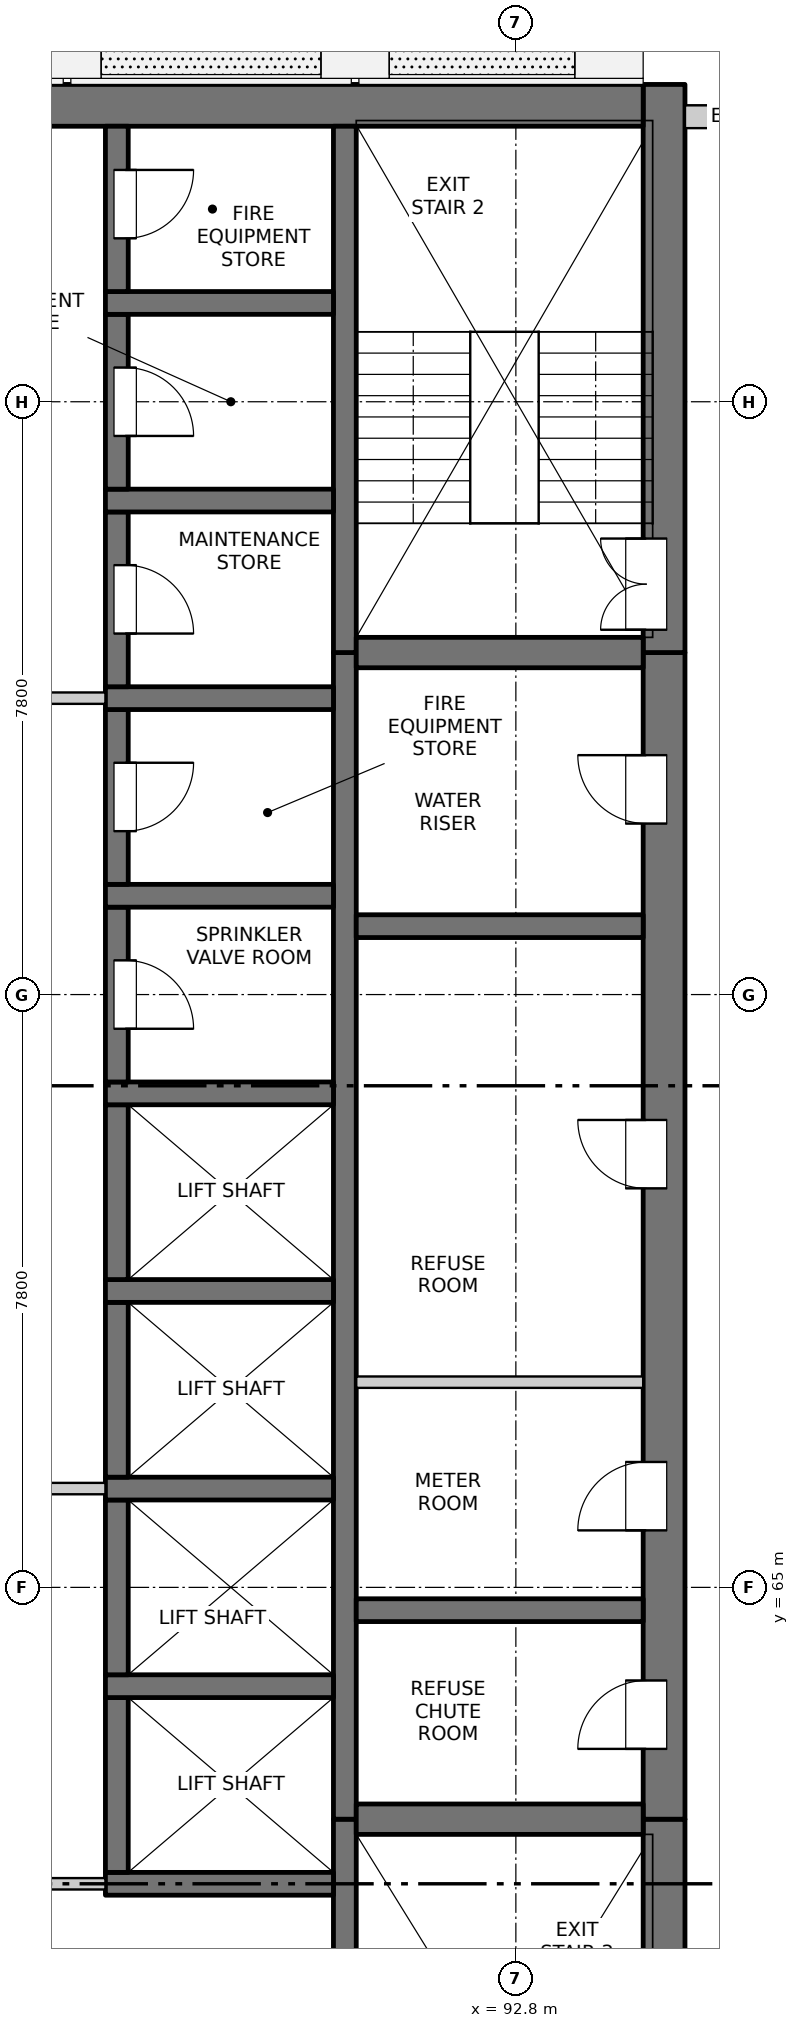
"""IFC4 building model, lengths in metres.
Left out: names, types, materials, properties, quantities, classifications, styles, units other than length and angle.
Written with IfcOpenShell. Run it as: python <this file> out.ifc"""

import sys

from ifc_helpers import new_model, si_unit, direction, frame, frame_2d, origin, place, context, subcontext, project, spatial, rectangle, extrude, element, fill, save


model = new_model("IFC4")
c1 = context("Model", 3, precision=1e-05, world=origin(), true_north=direction((0.0, 1.0)))
c2 = subcontext(c1, "Body", "Model", "MODEL_VIEW")
j1 = project(units=[si_unit("LENGTHUNIT", "METRE"), si_unit("PLANEANGLEUNIT", "RADIAN")], contexts=[c1])
p1 = place(None, origin())
s1 = spatial("IfcSite", under=j1, at=p1, CompositionType="ELEMENT")
p2 = place(p1, origin())
s2 = spatial("IfcBuilding", under=s1, at=p2, CompositionType="ELEMENT")
p3 = place(p2, frame((0.0, 0.0, 113.5)))
s3 = spatial("IfcBuildingStorey", under=s2, at=p3, CompositionType="ELEMENT", Elevation=113.5)
p4 = place(p3, frame((94.75, 54.975, -0.25), z_axis=(0.0, 0.0, 1.0), x_axis=(0.0, 1.0, 0.0)))
e1 = element("IfcWall", 1, at=p4, inside=s3, PredefinedType="SOLIDWALL", context=c2, shape_type="SweptSolid", body=[
    extrude(rectangle(XDim=6.975, YDim=0.55, at=frame_2d((3.487, 0.0))), origin(), (0.0, 0.0, 1.0), 3.35),
])
p5 = place(p4, frame((0.675, 0.0, 0.25)))
e2 = element("IfcOpeningElement", 2, at=p5, cuts=e1, PredefinedType="OPENING", context=c2, shape_type="SweptSolid", body=[
    extrude(rectangle(XDim=1.2, YDim=2.1, at=frame_2d((0.6, 1.05))), frame((0.0, 0.285, 0.0), z_axis=(0.0, -1.0, 0.0), x_axis=(1.0, 0.0, 0.0)), (0.0, 0.0, 1.0), 0.57),
])
p6 = place(p3, frame((94.75, 61.95, -0.25), z_axis=(0.0, 0.0, 1.0), x_axis=(0.0, 1.0, 0.0)))
e3 = element("IfcWall", 3, at=p6, inside=s3, PredefinedType="SOLIDWALL", context=c2, shape_type="SweptSolid", body=[
    extrude(rectangle(XDim=15.35, YDim=0.55, at=frame_2d((7.675, 0.0))), origin(), (0.0, 0.0, 1.0), 3.35),
])
p7 = place(p6, frame((0.925, 0.0, 0.25)))
e4 = element("IfcOpeningElement", 4, at=p7, cuts=e3, PredefinedType="OPENING", context=c2, shape_type="SweptSolid", body=[
    extrude(rectangle(XDim=0.9, YDim=2.1, at=frame_2d((0.45, 1.05))), frame((0.0, 0.285, 0.0), z_axis=(0.0, -1.0, 0.0), x_axis=(1.0, 0.0, 0.0)), (0.0, 0.0, 1.0), 0.57),
])
p8 = place(p6, frame((3.8, 0.0, 0.25)))
e5 = element("IfcOpeningElement", 5, at=p8, cuts=e3, PredefinedType="OPENING", context=c2, shape_type="SweptSolid", body=[
    extrude(rectangle(XDim=0.9, YDim=2.1, at=frame_2d((0.45, 1.05))), frame((0.0, 0.285, 0.0), z_axis=(0.0, -1.0, 0.0), x_axis=(1.0, 0.0, 0.0)), (0.0, 0.0, 1.0), 0.57),
])
p9 = place(p6, frame((8.3, 0.0, 0.25)))
e6 = element("IfcOpeningElement", 6, at=p9, cuts=e3, PredefinedType="OPENING", context=c2, shape_type="SweptSolid", body=[
    extrude(rectangle(XDim=0.9, YDim=2.1, at=frame_2d((0.45, 1.05))), frame((0.0, 0.285, 0.0), z_axis=(0.0, -1.0, 0.0), x_axis=(1.0, 0.0, 0.0)), (0.0, 0.0, 1.0), 0.57),
])
p10 = place(p6, frame((13.1, 0.0, 0.25)))
e7 = element("IfcOpeningElement", 7, at=p10, cuts=e3, PredefinedType="OPENING", context=c2, shape_type="SweptSolid", body=[
    extrude(rectangle(XDim=0.9, YDim=2.1, at=frame_2d((0.45, 1.05))), frame((0.0, 0.285, 0.0), z_axis=(0.0, -1.0, 0.0), x_axis=(1.0, 0.0, 0.0)), (0.0, 0.0, 1.0), 0.57),
])
p11 = place(p3, frame((94.75, 77.3, -0.25), z_axis=(0.0, 0.0, 1.0), x_axis=(0.0, 1.0, 0.0)))
e8 = element("IfcWall", 8, at=p11, inside=s3, PredefinedType="SOLIDWALL", context=c2, shape_type="SweptSolid", body=[
    extrude(rectangle(XDim=7.475, YDim=0.55, at=frame_2d((3.737, 0.0))), origin(), (0.0, 0.0, 1.0), 3.35),
])
p12 = place(p11, frame((0.3, 0.0, 0.25)))
e9 = element("IfcOpeningElement", 9, at=p12, cuts=e8, PredefinedType="OPENING", context=c2, shape_type="SweptSolid", body=[
    extrude(rectangle(XDim=1.2, YDim=2.1, at=frame_2d((0.6, 1.05))), frame((0.0, 0.285, 0.0), z_axis=(0.0, -1.0, 0.0), x_axis=(1.0, 0.0, 0.0)), (0.0, 0.0, 1.0), 0.57),
])
p13 = place(p3, frame((75.525, 84.5, -0.25), z_axis=(0.0, 0.0, 1.0), x_axis=(1.0, 0.0, 0.0)))
e10 = element("IfcWall", 10, at=p13, inside=s3, PredefinedType="SOLIDWALL", context=c2, shape_type="SweptSolid", body=[
    extrude(rectangle(XDim=18.95, YDim=0.55, at=frame_2d((9.475, 0.0))), origin(), (0.0, 0.0, 1.0), 3.35),
])
p14 = place(p3, frame((90.55, 55.525, -0.25), z_axis=(0.0, 0.0, 1.0), x_axis=(0.0, 1.0, 0.0)))
e11 = element("IfcWall", 11, at=p14, inside=s3, PredefinedType="SOLIDWALL", context=c2, shape_type="SweptSolid", body=[
    extrude(rectangle(XDim=6.425, YDim=0.3, at=frame_2d((3.212, 0.0))), origin(), (0.0, 0.0, 1.0), 3.35),
])
p15 = place(p14, frame((0.125, 0.0, 0.25)))
e12 = element("IfcOpeningElement", 12, at=p15, cuts=e11, PredefinedType="OPENING", context=c2, shape_type="SweptSolid", body=[
    extrude(rectangle(XDim=1.2, YDim=2.1, at=frame_2d((0.6, 1.05))), frame((0.0, 0.16, 0.0), z_axis=(0.0, -1.0, 0.0), x_axis=(1.0, 0.0, 0.0)), (0.0, 0.0, 1.0), 0.32),
])
p16 = place(p3, frame((90.55, 61.95, -0.25), z_axis=(0.0, 0.0, 1.0), x_axis=(0.0, 1.0, 0.0)))
e13 = element("IfcWall", 13, at=p16, inside=s3, PredefinedType="SOLIDWALL", context=c2, shape_type="SweptSolid", body=[
    extrude(rectangle(XDim=15.35, YDim=0.3, at=frame_2d((7.675, 0.0))), origin(), (0.0, 0.0, 1.0), 3.35),
])
p17 = place(p3, frame((90.55, 77.3, -0.25), z_axis=(0.0, 0.0, 1.0), x_axis=(0.0, 1.0, 0.0)))
e14 = element("IfcWall", 14, at=p17, inside=s3, PredefinedType="SOLIDWALL", context=c2, shape_type="SweptSolid", body=[
    extrude(rectangle(XDim=6.925, YDim=0.3, at=frame_2d((3.462, 0.0))), origin(), (0.0, 0.0, 1.0), 3.35),
])
p18 = place(p3, frame((87.4, 61.1, -0.25), z_axis=(0.0, 0.0, 1.0), x_axis=(1.0, 0.0, 0.0)))
e15 = element("IfcWall", 15, at=p18, inside=s3, PredefinedType="SOLIDWALL", context=c2, shape_type="SweptSolid", body=[
    extrude(rectangle(XDim=3.0, YDim=0.3, at=frame_2d((1.5, 0.0))), origin(), (0.0, 0.0, 1.0), 3.35),
])
p19 = place(p3, frame((87.55, 61.25, -0.25), z_axis=(0.0, 0.0, 1.0), x_axis=(0.0, 1.0, 0.0)))
e16 = element("IfcWall", 16, at=p19, inside=s3, PredefinedType="SOLIDWALL", context=c2, shape_type="SweptSolid", body=[
    extrude(rectangle(XDim=2.3, YDim=0.3, at=frame_2d((1.15, 0.0))), origin(), (0.0, 0.0, 1.0), 3.35),
])
p20 = place(p3, frame((87.4, 63.7, -0.25), z_axis=(0.0, 0.0, 1.0), x_axis=(1.0, 0.0, 0.0)))
e17 = element("IfcWall", 17, at=p20, inside=s3, PredefinedType="SOLIDWALL", context=c2, shape_type="SweptSolid", body=[
    extrude(rectangle(XDim=3.0, YDim=0.3, at=frame_2d((1.5, 0.0))), origin(), (0.0, 0.0, 1.0), 3.35),
])
p21 = place(p3, frame((87.55, 63.85, -0.25), z_axis=(0.0, 0.0, 1.0), x_axis=(0.0, 1.0, 0.0)))
e18 = element("IfcWall", 18, at=p21, inside=s3, PredefinedType="SOLIDWALL", context=c2, shape_type="SweptSolid", body=[
    extrude(rectangle(XDim=2.3, YDim=0.3, at=frame_2d((1.15, 0.0))), origin(), (0.0, 0.0, 1.0), 3.35),
])
p22 = place(p3, frame((87.4, 66.3, -0.25), z_axis=(0.0, 0.0, 1.0), x_axis=(1.0, 0.0, 0.0)))
e19 = element("IfcWall", 19, at=p22, inside=s3, PredefinedType="SOLIDWALL", context=c2, shape_type="SweptSolid", body=[
    extrude(rectangle(XDim=3.0, YDim=0.3, at=frame_2d((1.5, 0.0))), origin(), (0.0, 0.0, 1.0), 3.35),
])
p23 = place(p3, frame((87.55, 66.45, -0.25), z_axis=(0.0, 0.0, 1.0), x_axis=(0.0, 1.0, 0.0)))
e20 = element("IfcWall", 20, at=p23, inside=s3, PredefinedType="SOLIDWALL", context=c2, shape_type="SweptSolid", body=[
    extrude(rectangle(XDim=2.3, YDim=0.3, at=frame_2d((1.15, 0.0))), origin(), (0.0, 0.0, 1.0), 3.35),
])
p24 = place(p3, frame((87.4, 68.9, -0.25), z_axis=(0.0, 0.0, 1.0), x_axis=(1.0, 0.0, 0.0)))
e21 = element("IfcWall", 21, at=p24, inside=s3, PredefinedType="SOLIDWALL", context=c2, shape_type="SweptSolid", body=[
    extrude(rectangle(XDim=3.0, YDim=0.3, at=frame_2d((1.5, 0.0))), origin(), (0.0, 0.0, 1.0), 3.35),
])
p25 = place(p3, frame((87.55, 69.05, -0.25), z_axis=(0.0, 0.0, 1.0), x_axis=(0.0, 1.0, 0.0)))
e22 = element("IfcWall", 22, at=p25, inside=s3, PredefinedType="SOLIDWALL", context=c2, shape_type="SweptSolid", body=[
    extrude(rectangle(XDim=2.3, YDim=0.3, at=frame_2d((1.15, 0.0))), origin(), (0.0, 0.0, 1.0), 3.35),
])
p26 = place(p3, frame((87.4, 71.5, -0.25), z_axis=(0.0, 0.0, 1.0), x_axis=(1.0, 0.0, 0.0)))
e23 = element("IfcWall", 23, at=p26, inside=s3, PredefinedType="SOLIDWALL", context=c2, shape_type="SweptSolid", body=[
    extrude(rectangle(XDim=3.0, YDim=0.3, at=frame_2d((1.5, 0.0))), origin(), (0.0, 0.0, 1.0), 3.35),
])
p27 = place(p3, frame((87.55, 71.65, -0.25), z_axis=(0.0, 0.0, 1.0), x_axis=(0.0, 1.0, 0.0)))
e24 = element("IfcWall", 24, at=p27, inside=s3, PredefinedType="SOLIDWALL", context=c2, shape_type="SweptSolid", body=[
    extrude(rectangle(XDim=2.3, YDim=0.3, at=frame_2d((1.15, 0.0))), origin(), (0.0, 0.0, 1.0), 3.35),
])
p28 = place(p27, frame((0.7, 0.0, 0.25)))
e25 = element("IfcOpeningElement", 25, at=p28, cuts=e24, PredefinedType="OPENING", context=c2, shape_type="SweptSolid", body=[
    extrude(rectangle(XDim=0.9, YDim=2.1, at=frame_2d((0.45, 1.05))), frame((0.0, 0.16, 0.0), z_axis=(0.0, -1.0, 0.0), x_axis=(1.0, 0.0, 0.0)), (0.0, 0.0, 1.0), 0.32),
])
p29 = place(p3, frame((87.4, 74.1, -0.25), z_axis=(0.0, 0.0, 1.0), x_axis=(1.0, 0.0, 0.0)))
e26 = element("IfcWall", 26, at=p29, inside=s3, PredefinedType="SOLIDWALL", context=c2, shape_type="SweptSolid", body=[
    extrude(rectangle(XDim=3.0, YDim=0.3, at=frame_2d((1.5, 0.0))), origin(), (0.0, 0.0, 1.0), 3.35),
])
p30 = place(p3, frame((87.55, 74.25, -0.25), z_axis=(0.0, 0.0, 1.0), x_axis=(0.0, 1.0, 0.0)))
e27 = element("IfcWall", 27, at=p30, inside=s3, PredefinedType="SOLIDWALL", context=c2, shape_type="SweptSolid", body=[
    extrude(rectangle(XDim=2.3, YDim=0.3, at=frame_2d((1.15, 0.0))), origin(), (0.0, 0.0, 1.0), 3.35),
])
p31 = place(p30, frame((0.7, 0.0, 0.25)))
e28 = element("IfcOpeningElement", 28, at=p31, cuts=e27, PredefinedType="OPENING", context=c2, shape_type="SweptSolid", body=[
    extrude(rectangle(XDim=0.9, YDim=2.1, at=frame_2d((0.45, 1.05))), frame((0.0, 0.16, 0.0), z_axis=(0.0, -1.0, 0.0), x_axis=(1.0, 0.0, 0.0)), (0.0, 0.0, 1.0), 0.32),
])
p32 = place(p3, frame((87.4, 76.7, -0.25), z_axis=(0.0, 0.0, 1.0), x_axis=(1.0, 0.0, 0.0)))
e29 = element("IfcWall", 29, at=p32, inside=s3, PredefinedType="SOLIDWALL", context=c2, shape_type="SweptSolid", body=[
    extrude(rectangle(XDim=3.0, YDim=0.3, at=frame_2d((1.5, 0.0))), origin(), (0.0, 0.0, 1.0), 3.35),
])
p33 = place(p3, frame((87.55, 76.85, -0.25), z_axis=(0.0, 0.0, 1.0), x_axis=(0.0, 1.0, 0.0)))
e30 = element("IfcWall", 30, at=p33, inside=s3, PredefinedType="SOLIDWALL", context=c2, shape_type="SweptSolid", body=[
    extrude(rectangle(XDim=2.3, YDim=0.3, at=frame_2d((1.15, 0.0))), origin(), (0.0, 0.0, 1.0), 3.35),
])
p34 = place(p33, frame((0.7, 0.0, 0.25)))
e31 = element("IfcOpeningElement", 31, at=p34, cuts=e30, PredefinedType="OPENING", context=c2, shape_type="SweptSolid", body=[
    extrude(rectangle(XDim=0.9, YDim=2.1, at=frame_2d((0.45, 1.05))), frame((0.0, 0.16, 0.0), z_axis=(0.0, -1.0, 0.0), x_axis=(1.0, 0.0, 0.0)), (0.0, 0.0, 1.0), 0.32),
])
p35 = place(p3, frame((87.4, 79.3, -0.25), z_axis=(0.0, 0.0, 1.0), x_axis=(1.0, 0.0, 0.0)))
e32 = element("IfcWall", 32, at=p35, inside=s3, PredefinedType="SOLIDWALL", context=c2, shape_type="SweptSolid", body=[
    extrude(rectangle(XDim=3.0, YDim=0.3, at=frame_2d((1.5, 0.0))), origin(), (0.0, 0.0, 1.0), 3.35),
])
p36 = place(p3, frame((87.55, 79.45, -0.25), z_axis=(0.0, 0.0, 1.0), x_axis=(0.0, 1.0, 0.0)))
e33 = element("IfcWall", 33, at=p36, inside=s3, PredefinedType="SOLIDWALL", context=c2, shape_type="SweptSolid", body=[
    extrude(rectangle(XDim=2.3, YDim=0.3, at=frame_2d((1.15, 0.0))), origin(), (0.0, 0.0, 1.0), 3.35),
])
p37 = place(p36, frame((0.7, 0.0, 0.25)))
e34 = element("IfcOpeningElement", 34, at=p37, cuts=e33, PredefinedType="OPENING", context=c2, shape_type="SweptSolid", body=[
    extrude(rectangle(XDim=0.9, YDim=2.1, at=frame_2d((0.45, 1.05))), frame((0.0, 0.16, 0.0), z_axis=(0.0, -1.0, 0.0), x_axis=(1.0, 0.0, 0.0)), (0.0, 0.0, 1.0), 0.32),
])
p38 = place(p3, frame((87.4, 81.9, -0.25), z_axis=(0.0, 0.0, 1.0), x_axis=(1.0, 0.0, 0.0)))
e35 = element("IfcWall", 35, at=p38, inside=s3, PredefinedType="SOLIDWALL", context=c2, shape_type="SweptSolid", body=[
    extrude(rectangle(XDim=3.0, YDim=0.3, at=frame_2d((1.5, 0.0))), origin(), (0.0, 0.0, 1.0), 3.35),
])
p39 = place(p3, frame((87.55, 82.05, -0.25), z_axis=(0.0, 0.0, 1.0), x_axis=(0.0, 1.0, 0.0)))
e36 = element("IfcWall", 36, at=p39, inside=s3, PredefinedType="SOLIDWALL", context=c2, shape_type="SweptSolid", body=[
    extrude(rectangle(XDim=2.175, YDim=0.3, at=frame_2d((1.087, 0.0))), origin(), (0.0, 0.0, 1.0), 3.35),
])
p40 = place(p39, frame((0.7, 0.0, 0.25)))
e37 = element("IfcOpeningElement", 37, at=p40, cuts=e36, PredefinedType="OPENING", context=c2, shape_type="SweptSolid", body=[
    extrude(rectangle(XDim=0.9, YDim=2.1, at=frame_2d((0.45, 1.05))), frame((0.0, 0.16, 0.0), z_axis=(0.0, -1.0, 0.0), x_axis=(1.0, 0.0, 0.0)), (0.0, 0.0, 1.0), 0.32),
])
p41 = place(p3, frame((90.7, 61.95, -0.25), z_axis=(0.0, 0.0, 1.0), x_axis=(1.0, 0.0, 0.0)))
e38 = element("IfcWall", 38, at=p41, inside=s3, PredefinedType="SOLIDWALL", context=c2, shape_type="SweptSolid", body=[
    extrude(rectangle(XDim=3.775, YDim=0.4, at=frame_2d((1.888, 0.0))), origin(), (0.0, 0.0, 1.0), 3.35),
])
for number, where, z_axis, x_axis in (
    (39, (90.7, 64.7, -0.25), (0.0, 0.0, 1.0), (1.0, 0.0, 0.0)),
    (40, (90.7, 73.7, -0.25), (0.0, 0.0, 1.0), (1.0, 0.0, 0.0)),
):
    element("IfcWall", number, at=place(p3, frame(where, z_axis=z_axis, x_axis=x_axis)), inside=s3, PredefinedType="SOLIDWALL", context=c2, shape_type="SweptSolid", body=[
        extrude(rectangle(XDim=3.775, YDim=0.3, at=frame_2d((1.888, 0.0))), origin(), (0.0, 0.0, 1.0), 3.35),
    ])
p42 = place(p3, frame((90.7, 77.3, -0.25), z_axis=(0.0, 0.0, 1.0), x_axis=(1.0, 0.0, 0.0)))
e41 = element("IfcWall", 41, at=p42, inside=s3, PredefinedType="SOLIDWALL", context=c2, shape_type="SweptSolid", body=[
    extrude(rectangle(XDim=3.775, YDim=0.4, at=frame_2d((1.888, 0.0))), origin(), (0.0, 0.0, 1.0), 3.35),
])
p43 = place(p3, frame((95.025, 84.35, 0.0), z_axis=(0.0, 0.0, 1.0), x_axis=(1.0, 0.0, 0.0)))
e42 = element("IfcWall", 42, at=p43, inside=s3, PredefinedType="SOLIDWALL", context=c2, shape_type="SweptSolid", body=[
    extrude(rectangle(XDim=1.25, YDim=0.3, at=frame_2d((0.625, 0.0))), origin(), (0.0, 0.0, 1.0), 3.1),
])
p44 = place(p3, frame((82.6, 61.1, 0.0), z_axis=(0.0, 0.0, 1.0), x_axis=(1.0, 0.0, 0.0)))
e43 = element("IfcWall", 43, at=p44, inside=s3, PredefinedType="PARTITIONING", context=c2, shape_type="SweptSolid", body=[
    extrude(rectangle(XDim=4.8, YDim=0.15, at=frame_2d((2.4, 0.0))), origin(), (0.0, 0.0, 1.0), 3.1),
])
p45 = place(p44, frame((1.5, 0.0, 0.0)))
e44 = element("IfcOpeningElement", 44, at=p45, cuts=e43, PredefinedType="OPENING", context=c2, shape_type="SweptSolid", body=[
    extrude(rectangle(XDim=1.8, YDim=2.1, at=frame_2d((0.9, 1.05))), frame((0.0, 0.085, 0.0), z_axis=(0.0, -1.0, 0.0), x_axis=(1.0, 0.0, 0.0)), (0.0, 0.0, 1.0), 0.17),
])
p46 = place(p3, frame((82.6, 66.3, 0.0), z_axis=(0.0, 0.0, 1.0), x_axis=(1.0, 0.0, 0.0)))
e45 = element("IfcWall", 45, at=p46, inside=s3, PredefinedType="PARTITIONING", context=c2, shape_type="SweptSolid", body=[
    extrude(rectangle(XDim=4.8, YDim=0.15, at=frame_2d((2.4, 0.0))), origin(), (0.0, 0.0, 1.0), 3.1),
])
p47 = place(p46, frame((1.5, 0.0, 0.0)))
e46 = element("IfcOpeningElement", 46, at=p47, cuts=e45, PredefinedType="OPENING", context=c2, shape_type="SweptSolid", body=[
    extrude(rectangle(XDim=1.8, YDim=2.1, at=frame_2d((0.9, 1.05))), frame((0.0, 0.085, 0.0), z_axis=(0.0, -1.0, 0.0), x_axis=(1.0, 0.0, 0.0)), (0.0, 0.0, 1.0), 0.17),
])
p48 = place(p3, frame((90.7, 67.7, 0.0), z_axis=(0.0, 0.0, 1.0), x_axis=(1.0, 0.0, 0.0)))
e47 = element("IfcWall", 47, at=p48, inside=s3, PredefinedType="PARTITIONING", context=c2, shape_type="SweptSolid", body=[
    extrude(rectangle(XDim=3.775, YDim=0.15, at=frame_2d((1.887, 0.0))), origin(), (0.0, 0.0, 1.0), 3.1),
])
p49 = place(p3, frame((82.6, 76.7, 0.0), z_axis=(0.0, 0.0, 1.0), x_axis=(1.0, 0.0, 0.0)))
e48 = element("IfcWall", 48, at=p49, inside=s3, PredefinedType="PARTITIONING", context=c2, shape_type="SweptSolid", body=[
    extrude(rectangle(XDim=4.8, YDim=0.15, at=frame_2d((2.4, 0.0))), origin(), (0.0, 0.0, 1.0), 3.1),
])
p50 = place(p49, frame((1.5, 0.0, 0.0)))
e49 = element("IfcOpeningElement", 49, at=p50, cuts=e48, PredefinedType="OPENING", context=c2, shape_type="SweptSolid", body=[
    extrude(rectangle(XDim=1.8, YDim=2.1, at=frame_2d((0.9, 1.05))), frame((0.0, 0.085, 0.0), z_axis=(0.0, -1.0, 0.0), x_axis=(1.0, 0.0, 0.0)), (0.0, 0.0, 1.0), 0.17),
])
p51 = place(p7, origin())
e50 = element("IfcDoor", 50, at=p51, inside=s3, OperationType="SINGLE_SWING_LEFT", PredefinedType="DOOR", context=c2, shape_type="SweptSolid", body=[
    extrude(rectangle(XDim=0.9, YDim=2.1, at=frame_2d((0.45, 1.05))), frame((0.0, 0.26, 0.0), z_axis=(0.0, -1.0, 0.0), x_axis=(1.0, 0.0, 0.0)), (0.0, 0.0, 1.0), 0.05),
])
fill(e4, e50)
p52 = place(p8, origin())
e51 = element("IfcDoor", 51, at=p52, inside=s3, OperationType="SINGLE_SWING_LEFT", PredefinedType="DOOR", context=c2, shape_type="SweptSolid", body=[
    extrude(rectangle(XDim=0.9, YDim=2.1, at=frame_2d((0.45, 1.05))), frame((0.0, 0.26, 0.0), z_axis=(0.0, -1.0, 0.0), x_axis=(1.0, 0.0, 0.0)), (0.0, 0.0, 1.0), 0.05),
])
fill(e5, e51)
p53 = place(p9, origin())
e52 = element("IfcDoor", 52, at=p53, inside=s3, OperationType="SINGLE_SWING_RIGHT", PredefinedType="DOOR", context=c2, shape_type="SweptSolid", body=[
    extrude(rectangle(XDim=0.9, YDim=2.1, at=frame_2d((0.45, 1.05))), frame((0.0, 0.26, 0.0), z_axis=(0.0, -1.0, 0.0), x_axis=(1.0, 0.0, 0.0)), (0.0, 0.0, 1.0), 0.05),
])
fill(e6, e52)
p54 = place(p28, origin())
e53 = element("IfcDoor", 53, at=p54, inside=s3, OperationType="SINGLE_SWING_RIGHT", PredefinedType="DOOR", context=c2, shape_type="SweptSolid", body=[
    extrude(rectangle(XDim=0.9, YDim=2.1, at=frame_2d((0.45, 1.05))), frame((0.0, -0.085, 0.0), z_axis=(0.0, -1.0, 0.0), x_axis=(1.0, 0.0, 0.0)), (0.0, 0.0, 1.0), 0.05),
])
fill(e25, e53)
p55 = place(p31, origin())
e54 = element("IfcDoor", 54, at=p55, inside=s3, OperationType="SINGLE_SWING_LEFT", PredefinedType="DOOR", context=c2, shape_type="SweptSolid", body=[
    extrude(rectangle(XDim=0.9, YDim=2.1, at=frame_2d((0.45, 1.05))), frame((0.0, -0.085, 0.0), z_axis=(0.0, -1.0, 0.0), x_axis=(1.0, 0.0, 0.0)), (0.0, 0.0, 1.0), 0.05),
])
fill(e28, e54)
p56 = place(p10, origin())
e55 = element("IfcDoor", 55, at=p56, inside=s3, OperationType="SINGLE_SWING_RIGHT", PredefinedType="DOOR", context=c2, shape_type="SweptSolid", body=[
    extrude(rectangle(XDim=0.9, YDim=2.1, at=frame_2d((0.45, 1.05))), frame((0.0, 0.26, 0.0), z_axis=(0.0, -1.0, 0.0), x_axis=(1.0, 0.0, 0.0)), (0.0, 0.0, 1.0), 0.05),
])
fill(e7, e55)
p57 = place(p34, origin())
e56 = element("IfcDoor", 56, at=p57, inside=s3, OperationType="SINGLE_SWING_RIGHT", PredefinedType="DOOR", context=c2, shape_type="SweptSolid", body=[
    extrude(rectangle(XDim=0.9, YDim=2.1, at=frame_2d((0.45, 1.05))), frame((0.0, -0.085, 0.0), z_axis=(0.0, -1.0, 0.0), x_axis=(1.0, 0.0, 0.0)), (0.0, 0.0, 1.0), 0.05),
])
fill(e31, e56)
p58 = place(p12, origin())
e57 = element("IfcDoor", 57, at=p58, inside=s3, OperationType="DOUBLE_DOOR_SINGLE_SWING", PredefinedType="DOOR", context=c2, shape_type="SweptSolid", body=[
    extrude(rectangle(XDim=1.2, YDim=2.1, at=frame_2d((0.6, 1.05))), frame((0.0, 0.26, 0.0), z_axis=(0.0, -1.0, 0.0), x_axis=(1.0, 0.0, 0.0)), (0.0, 0.0, 1.0), 0.05),
])
fill(e9, e57)
p59 = place(p37, origin())
e58 = element("IfcDoor", 58, at=p59, inside=s3, OperationType="SINGLE_SWING_RIGHT", PredefinedType="DOOR", context=c2, shape_type="SweptSolid", body=[
    extrude(rectangle(XDim=0.9, YDim=2.1, at=frame_2d((0.45, 1.05))), frame((0.0, -0.085, 0.0), z_axis=(0.0, -1.0, 0.0), x_axis=(1.0, 0.0, 0.0)), (0.0, 0.0, 1.0), 0.05),
])
fill(e34, e58)
p60 = place(p40, origin())
e59 = element("IfcDoor", 59, at=p60, inside=s3, OperationType="SINGLE_SWING_LEFT", PredefinedType="DOOR", context=c2, shape_type="SweptSolid", body=[
    extrude(rectangle(XDim=0.9, YDim=2.1, at=frame_2d((0.45, 1.05))), frame((0.0, -0.085, 0.0), z_axis=(0.0, -1.0, 0.0), x_axis=(1.0, 0.0, 0.0)), (0.0, 0.0, 1.0), 0.05),
])
fill(e37, e59)
save(model, sys.argv[1])
